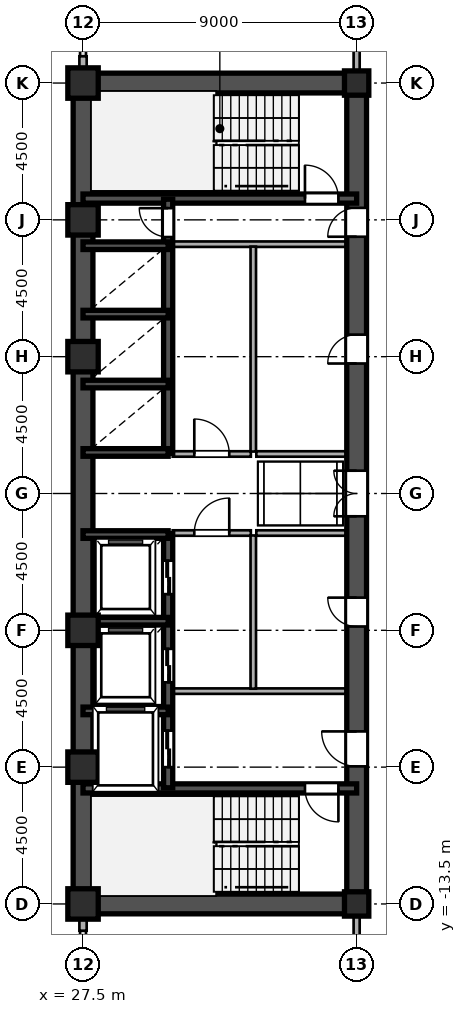
"""IFC4 building model, lengths in metres.
Left out: names, types, materials, properties, quantities, classifications, styles, units other than length and angle.
Written with IfcOpenShell. Run it as: python <this file> out.ifc"""

import sys

from ifc_helpers import new_model, si_unit, direction, frame, frame_2d, origin, origin_2d, place, context, subcontext, project, spatial, rectangle, hollow_rectangle, i_section, extrude, source, transform, mapped, element, fill, save


model = new_model("IFC4")
c1 = context("Model", 3, precision=1e-05, world=origin(), true_north=direction((0.0, 1.0)))
c2 = subcontext(c1, "Body", "Model", "MODEL_VIEW")
j1 = project(units=[si_unit("LENGTHUNIT", "METRE"), si_unit("PLANEANGLEUNIT", "RADIAN")], contexts=[c1])
p1 = place(None, origin())
s1 = spatial("IfcSite", under=j1, at=p1, CompositionType="ELEMENT")
p2 = place(p1, origin())
s2 = spatial("IfcBuilding", under=s1, at=p2, CompositionType="ELEMENT")
p3 = place(p2, frame((0.0, 0.0, 65.7)))
s3 = spatial("IfcBuildingStorey", under=s2, at=p3, CompositionType="ELEMENT", Elevation=65.7)
m1 = source(origin(), c2, "Body", "SweptSolid", [
    extrude(hollow_rectangle(XDim=1.0, YDim=1.0, WallThickness=0.042, at=origin_2d()), origin(), (0.0, 0.0, 1.0), 3.6),
])
for number, where, z_axis, x_axis in (
    (1, (27.5, -13.5, 0.0), (0.0, 0.0, 1.0), (1.0, 0.0, 0.0)),
    (2, (27.5, -9.0, 0.0), (0.0, 0.0, 1.0), (1.0, 0.0, 0.0)),
    (3, (27.5, -4.5, 0.0), (0.0, 0.0, 1.0), (1.0, 0.0, 0.0)),
    (4, (27.5, 4.5, 0.0), (0.0, 0.0, 1.0), (1.0, 0.0, 0.0)),
    (5, (27.5, 9.0, 0.0), (0.0, 0.0, 1.0), (1.0, 0.0, 0.0)),
    (6, (27.5, 13.5, 0.0), (0.0, 0.0, 1.0), (1.0, 0.0, 0.0)),
):
    element("IfcColumn", number, at=place(p3, frame(where, z_axis=z_axis, x_axis=x_axis)), inside=s3, PredefinedType="COLUMN", context=c2, shape_type="MappedRepresentation", body=[
        mapped(m1, transform((0.0, 0.0, 0.0), scale=1.0)),
    ])
m2 = source(origin(), c2, "Body", "SweptSolid", [
    extrude(i_section(OverallWidth=0.8, OverallDepth=0.8, WebThickness=0.032, FlangeThickness=0.05, at=origin_2d()), origin(), (0.0, 0.0, 1.0), 3.6),
])
for number, where, z_axis, x_axis in (
    (7, (36.5, -13.5, 0.0), (0.0, 0.0, 1.0), (1.0, 0.0, 0.0)),
    (8, (36.5, 13.5, 0.0), (0.0, 0.0, 1.0), (1.0, 0.0, 0.0)),
):
    element("IfcColumn", number, at=place(p3, frame(where, z_axis=z_axis, x_axis=x_axis)), inside=s3, PredefinedType="COLUMN", context=c2, shape_type="MappedRepresentation", body=[
        mapped(m2, transform((0.0, 0.0, 0.0), scale=1.0)),
    ])
for number, where, z_axis, x_axis in (
    (9, (27.5, -14.38, 0.0), (0.0, 0.0, 1.0), (0.0, 1.0, 0.0)),
    (10, (27.5, 13.83, 0.0), (0.0, 0.0, 1.0), (0.0, 1.0, 0.0)),
):
    element("IfcWall", number, at=place(p3, frame(where, z_axis=z_axis, x_axis=x_axis)), inside=s3, PredefinedType="SOLIDWALL", context=c2, shape_type="SweptSolid", body=[
        extrude(rectangle(XDim=0.55, YDim=0.24, at=frame_2d((0.275, 0.0))), origin(), (0.0, 0.0, 1.0), 2.88),
    ])
for number, where, z_axis, x_axis in (
    (11, (27.5, -13.5, 0.0), (0.0, 0.0, 1.0), (0.0, 1.0, 0.0)),
    (12, (27.5, 1.3, 0.0), (0.0, 0.0, 1.0), (0.0, 1.0, 0.0)),
):
    element("IfcWall", number, at=place(p3, frame(where, z_axis=z_axis, x_axis=x_axis)), inside=s3, PredefinedType="SHEAR", context=c2, shape_type="SweptSolid", body=[
        extrude(rectangle(XDim=12.2, YDim=0.65, at=frame_2d((6.1, 0.0))), origin(), (0.0, 0.0, 1.0), 3.38),
    ])
p4 = place(p3, frame((27.5, -1.3, 0.0), z_axis=(0.0, 0.0, 1.0), x_axis=(0.0, 1.0, 0.0)))
e13 = element("IfcWall", 13, at=p4, inside=s3, PredefinedType="SHEAR", context=c2, shape_type="SweptSolid", body=[
    extrude(rectangle(XDim=2.6, YDim=0.65, at=frame_2d((1.3, 0.0))), origin(), (0.0, 0.0, 1.0), 3.38),
])
for number, where, z_axis, x_axis in (
    (14, (27.5, -13.5, 0.0), (0.0, 0.0, 1.0), (1.0, 0.0, 0.0)),
    (15, (27.5, 13.5, 0.0), (0.0, 0.0, 1.0), (1.0, 0.0, 0.0)),
):
    element("IfcWall", number, at=place(p3, frame(where, z_axis=z_axis, x_axis=x_axis)), inside=s3, PredefinedType="SHEAR", context=c2, shape_type="SweptSolid", body=[
        extrude(rectangle(XDim=9.0, YDim=0.65, at=frame_2d((4.5, 0.0))), origin(), (0.0, 0.0, 1.0), 3.38),
    ])
p5 = place(p3, frame((36.5, -13.65, 0.0), z_axis=(0.0, 0.0, 1.0), x_axis=(0.0, 1.0, 0.0)))
e16 = element("IfcWall", 16, at=p5, inside=s3, PredefinedType="SHEAR", context=c2, shape_type="SweptSolid", body=[
    extrude(rectangle(XDim=7.15, YDim=0.65, at=frame_2d((3.575, 0.0))), origin(), (0.0, 0.0, 1.0), 3.38),
])
p6 = place(p5, frame((4.675, 0.0, 0.0)))
e17 = element("IfcOpeningElement", 17, at=p6, cuts=e16, PredefinedType="OPENING", context=c2, shape_type="SweptSolid", body=[
    extrude(rectangle(XDim=1.15, YDim=2.2, at=frame_2d((0.575, 1.1))), frame((0.0, 0.335, 0.0), z_axis=(0.0, -1.0, 0.0), x_axis=(1.0, 0.0, 0.0)), (0.0, 0.0, 1.0), 0.67),
])
p7 = place(p3, frame((36.5, -1.3, 0.0), z_axis=(0.0, 0.0, 1.0), x_axis=(0.0, 1.0, 0.0)))
e18 = element("IfcWall", 18, at=p7, inside=s3, PredefinedType="SHEAR", context=c2, shape_type="SweptSolid", body=[
    extrude(rectangle(XDim=2.6, YDim=0.65, at=frame_2d((1.3, 0.0))), origin(), (0.0, 0.0, 1.0), 3.38),
])
p8 = place(p7, frame((0.55, 0.0, 0.0)))
e19 = element("IfcOpeningElement", 19, at=p8, cuts=e18, PredefinedType="OPENING", context=c2, shape_type="SweptSolid", body=[
    extrude(rectangle(XDim=1.5, YDim=2.3, at=frame_2d((0.75, 1.15))), frame((0.0, 0.335, 0.0), z_axis=(0.0, -1.0, 0.0), x_axis=(1.0, 0.0, 0.0)), (0.0, 0.0, 1.0), 0.67),
])
p9 = place(p3, frame((36.5, 8.2, 0.0), z_axis=(0.0, 0.0, 1.0), x_axis=(0.0, 1.0, 0.0)))
e20 = element("IfcWall", 20, at=p9, inside=s3, PredefinedType="SHEAR", context=c2, shape_type="SweptSolid", body=[
    extrude(rectangle(XDim=5.45, YDim=0.65, at=frame_2d((2.725, 0.0))), origin(), (0.0, 0.0, 1.0), 3.38),
])
p10 = place(p9, frame((0.245, 0.0, 0.0)))
e21 = element("IfcOpeningElement", 21, at=p10, cuts=e20, PredefinedType="OPENING", context=c2, shape_type="SweptSolid", body=[
    extrude(rectangle(XDim=0.95, YDim=2.15, at=frame_2d((0.475, 1.075))), frame((0.0, 0.335, 0.0), z_axis=(0.0, -1.0, 0.0), x_axis=(1.0, 0.0, 0.0)), (0.0, 0.0, 1.0), 0.67),
])
p11 = place(p3, frame((36.5, -6.5, 0.0), z_axis=(0.0, 0.0, 1.0), x_axis=(0.0, 1.0, 0.0)))
e22 = element("IfcWall", 22, at=p11, inside=s3, PredefinedType="SHEAR", context=c2, shape_type="SweptSolid", body=[
    extrude(rectangle(XDim=5.2, YDim=0.65, at=frame_2d((2.6, 0.0))), origin(), (0.0, 0.0, 1.0), 3.38),
])
p12 = place(p11, frame((2.125, 0.0, 0.0)))
e23 = element("IfcOpeningElement", 23, at=p12, cuts=e22, PredefinedType="OPENING", context=c2, shape_type="SweptSolid", body=[
    extrude(rectangle(XDim=0.95, YDim=2.15, at=frame_2d((0.475, 1.075))), frame((0.0, 0.335, 0.0), z_axis=(0.0, -1.0, 0.0), x_axis=(1.0, 0.0, 0.0)), (0.0, 0.0, 1.0), 0.67),
])
p13 = place(p3, frame((36.5, 1.3, 0.0), z_axis=(0.0, 0.0, 1.0), x_axis=(0.0, 1.0, 0.0)))
e24 = element("IfcWall", 24, at=p13, inside=s3, PredefinedType="SHEAR", context=c2, shape_type="SweptSolid", body=[
    extrude(rectangle(XDim=6.9, YDim=0.65, at=frame_2d((3.45, 0.0))), origin(), (0.0, 0.0, 1.0), 3.38),
])
p14 = place(p13, frame((2.975, 0.0, 0.0)))
e25 = element("IfcOpeningElement", 25, at=p14, cuts=e24, PredefinedType="OPENING", context=c2, shape_type="SweptSolid", body=[
    extrude(rectangle(XDim=0.95, YDim=2.15, at=frame_2d((0.475, 1.075))), frame((0.0, 0.335, 0.0), z_axis=(0.0, -1.0, 0.0), x_axis=(1.0, 0.0, 0.0)), (0.0, 0.0, 1.0), 0.67),
])
p15 = place(p3, frame((27.5, -9.7, 0.0), z_axis=(0.0, 0.0, 1.0), x_axis=(1.0, 0.0, 0.0)))
e26 = element("IfcWall", 26, at=p15, inside=s3, PredefinedType="SHEAR", context=c2, shape_type="SweptSolid", body=[
    extrude(rectangle(XDim=9.0, YDim=0.3, at=frame_2d((4.5, 0.0))), origin(), (0.0, 0.0, 1.0), 3.38),
])
p16 = place(p15, frame((7.3, 0.0, 0.0)))
e27 = element("IfcOpeningElement", 27, at=p16, cuts=e26, PredefinedType="OPENING", context=c2, shape_type="SweptSolid", body=[
    extrude(rectangle(XDim=1.1, YDim=2.2, at=frame_2d((0.55, 1.1))), frame((0.0, 0.16, 0.0), z_axis=(0.0, -1.0, 0.0), x_axis=(1.0, 0.0, 0.0)), (0.0, 0.0, 1.0), 0.32),
])
p17 = place(p3, frame((27.5, 9.7, 0.0), z_axis=(0.0, 0.0, 1.0), x_axis=(1.0, 0.0, 0.0)))
e28 = element("IfcWall", 28, at=p17, inside=s3, PredefinedType="SHEAR", context=c2, shape_type="SweptSolid", body=[
    extrude(rectangle(XDim=9.0, YDim=0.3, at=frame_2d((4.5, 0.0))), origin(), (0.0, 0.0, 1.0), 3.38),
])
p18 = place(p17, frame((7.3, 0.0, 0.0)))
e29 = element("IfcOpeningElement", 29, at=p18, cuts=e28, PredefinedType="OPENING", context=c2, shape_type="SweptSolid", body=[
    extrude(rectangle(XDim=1.1, YDim=2.2, at=frame_2d((0.55, 1.1))), frame((0.0, 0.16, 0.0), z_axis=(0.0, -1.0, 0.0), x_axis=(1.0, 0.0, 0.0)), (0.0, 0.0, 1.0), 0.32),
])
for number, where, z_axis, x_axis in (
    (30, (27.5, -7.15, 0.0), (0.0, 0.0, 1.0), (1.0, 0.0, 0.0)),
    (31, (27.5, -4.2, 0.0), (0.0, 0.0, 1.0), (1.0, 0.0, 0.0)),
    (32, (27.5, -1.35, 0.0), (0.0, 0.0, 1.0), (1.0, 0.0, 0.0)),
    (33, (27.5, 1.35, 0.0), (0.0, 0.0, 1.0), (1.0, 0.0, 0.0)),
    (34, (27.5, 3.6, 0.0), (0.0, 0.0, 1.0), (1.0, 0.0, 0.0)),
    (35, (27.5, 5.9, 0.0), (0.0, 0.0, 1.0), (1.0, 0.0, 0.0)),
    (36, (27.5, 8.15, 0.0), (0.0, 0.0, 1.0), (1.0, 0.0, 0.0)),
):
    element("IfcWall", number, at=place(p3, frame(where, z_axis=z_axis, x_axis=x_axis)), inside=s3, PredefinedType="SHEAR", context=c2, shape_type="SweptSolid", body=[
        extrude(rectangle(XDim=2.8, YDim=0.25, at=frame_2d((1.4, 0.0))), origin(), (0.0, 0.0, 1.0), 3.38),
    ])
p19 = place(p3, frame((30.3, -9.68, 0.0), z_axis=(0.0, 0.0, 1.0), x_axis=(0.0, 1.0, 0.0)))
e37 = element("IfcWall", 37, at=p19, inside=s3, PredefinedType="SHEAR", context=c2, shape_type="SweptSolid", body=[
    extrude(rectangle(XDim=2.56, YDim=0.3, at=frame_2d((1.28, 0.0))), origin(), (0.0, 0.0, 1.0), 3.38),
])
p20 = place(p19, frame((0.68, 0.0, 0.0)))
e38 = element("IfcOpeningElement", 38, at=p20, cuts=e37, PredefinedType="OPENING", context=c2, shape_type="SweptSolid", body=[
    extrude(rectangle(XDim=1.2, YDim=2.25, at=frame_2d((0.6, 1.125))), frame((0.0, 0.16, 0.0), z_axis=(0.0, -1.0, 0.0), x_axis=(1.0, 0.0, 0.0)), (0.0, 0.0, 1.0), 0.32),
])
p21 = place(p3, frame((30.3, -7.12, 0.0), z_axis=(0.0, 0.0, 1.0), x_axis=(0.0, 1.0, 0.0)))
e39 = element("IfcWall", 39, at=p21, inside=s3, PredefinedType="SHEAR", context=c2, shape_type="SweptSolid", body=[
    extrude(rectangle(XDim=2.92, YDim=0.3, at=frame_2d((1.46, 0.0))), origin(), (0.0, 0.0, 1.0), 3.38),
])
p22 = place(p21, frame((0.91, 0.0, 0.0)))
e40 = element("IfcOpeningElement", 40, at=p22, cuts=e39, PredefinedType="OPENING", context=c2, shape_type="SweptSolid", body=[
    extrude(rectangle(XDim=1.1, YDim=2.2, at=frame_2d((0.55, 1.1))), frame((0.0, 0.16, 0.0), z_axis=(0.0, -1.0, 0.0), x_axis=(1.0, 0.0, 0.0)), (0.0, 0.0, 1.0), 0.32),
])
p23 = place(p3, frame((30.3, -4.2, 0.0), z_axis=(0.0, 0.0, 1.0), x_axis=(0.0, 1.0, 0.0)))
e41 = element("IfcWall", 41, at=p23, inside=s3, PredefinedType="SHEAR", context=c2, shape_type="SweptSolid", body=[
    extrude(rectangle(XDim=2.88, YDim=0.3, at=frame_2d((1.44, 0.0))), origin(), (0.0, 0.0, 1.0), 3.38),
])
p24 = place(p23, frame((0.89, 0.0, 0.0)))
e42 = element("IfcOpeningElement", 42, at=p24, cuts=e41, PredefinedType="OPENING", context=c2, shape_type="SweptSolid", body=[
    extrude(rectangle(XDim=1.1, YDim=2.2, at=frame_2d((0.55, 1.1))), frame((0.0, 0.16, 0.0), z_axis=(0.0, -1.0, 0.0), x_axis=(1.0, 0.0, 0.0)), (0.0, 0.0, 1.0), 0.32),
])
p25 = place(p3, frame((30.3, 1.32, 0.0), z_axis=(0.0, 0.0, 1.0), x_axis=(0.0, 1.0, 0.0)))
e43 = element("IfcWall", 43, at=p25, inside=s3, PredefinedType="SHEAR", context=c2, shape_type="SweptSolid", body=[
    extrude(rectangle(XDim=2.28, YDim=0.3, at=frame_2d((1.14, 0.0))), origin(), (0.0, 0.0, 1.0), 3.38),
])
p26 = place(p3, frame((30.3, 3.6, 0.0), z_axis=(0.0, 0.0, 1.0), x_axis=(0.0, 1.0, 0.0)))
e44 = element("IfcWall", 44, at=p26, inside=s3, PredefinedType="SHEAR", context=c2, shape_type="SweptSolid", body=[
    extrude(rectangle(XDim=2.3, YDim=0.3, at=frame_2d((1.15, 0.0))), origin(), (0.0, 0.0, 1.0), 3.38),
])
p27 = place(p3, frame((30.3, 5.9, 0.0), z_axis=(0.0, 0.0, 1.0), x_axis=(0.0, 1.0, 0.0)))
e45 = element("IfcWall", 45, at=p27, inside=s3, PredefinedType="SHEAR", context=c2, shape_type="SweptSolid", body=[
    extrude(rectangle(XDim=2.25, YDim=0.3, at=frame_2d((1.125, 0.0))), origin(), (0.0, 0.0, 1.0), 3.38),
])
p28 = place(p3, frame((30.3, 8.15, 0.0), z_axis=(0.0, 0.0, 1.0), x_axis=(0.0, 1.0, 0.0)))
e46 = element("IfcWall", 46, at=p28, inside=s3, PredefinedType="SHEAR", context=c2, shape_type="SweptSolid", body=[
    extrude(rectangle(XDim=1.53, YDim=0.3, at=frame_2d((0.765, 0.0))), origin(), (0.0, 0.0, 1.0), 3.38),
])
p29 = place(p28, frame((0.285, 0.0, 0.0)))
e47 = element("IfcOpeningElement", 47, at=p29, cuts=e46, PredefinedType="OPENING", context=c2, shape_type="SweptSolid", body=[
    extrude(rectangle(XDim=0.95, YDim=2.15, at=frame_2d((0.475, 1.075))), frame((0.0, 0.16, 0.0), z_axis=(0.0, -1.0, 0.0), x_axis=(1.0, 0.0, 0.0)), (0.0, 0.0, 1.0), 0.32),
])
for number, where, z_axis, x_axis in (
    (48, (30.45, -6.5, 0.0), (0.0, 0.0, 1.0), (1.0, 0.0, 0.0)),
    (49, (30.45, 8.2, 0.0), (0.0, 0.0, 1.0), (1.0, 0.0, 0.0)),
):
    element("IfcWall", number, at=place(p3, frame(where, z_axis=z_axis, x_axis=x_axis)), inside=s3, PredefinedType="PARTITIONING", context=c2, shape_type="SweptSolid", body=[
        extrude(rectangle(XDim=5.7, YDim=0.18, at=frame_2d((2.85, 0.0))), origin(), (0.0, 0.0, 1.0), 3.38),
    ])
p30 = place(p3, frame((33.1, -6.42, 0.0), z_axis=(0.0, 0.0, 1.0), x_axis=(0.0, 1.0, 0.0)))
e50 = element("IfcWall", 50, at=p30, inside=s3, PredefinedType="PARTITIONING", context=c2, shape_type="SweptSolid", body=[
    extrude(rectangle(XDim=5.04, YDim=0.18, at=frame_2d((2.52, 0.0))), origin(), (0.0, 0.0, 1.0), 3.38),
])
p31 = place(p3, frame((33.1, 1.38, 0.0), z_axis=(0.0, 0.0, 1.0), x_axis=(0.0, 1.0, 0.0)))
e51 = element("IfcWall", 51, at=p31, inside=s3, PredefinedType="PARTITIONING", context=c2, shape_type="SweptSolid", body=[
    extrude(rectangle(XDim=6.74, YDim=0.18, at=frame_2d((3.37, 0.0))), origin(), (0.0, 0.0, 1.0), 3.38),
])
p32 = place(p3, frame((30.45, -1.3, 0.0), z_axis=(0.0, 0.0, 1.0), x_axis=(1.0, 0.0, 0.0)))
e52 = element("IfcWall", 52, at=p32, inside=s3, PredefinedType="PARTITIONING", context=c2, shape_type="SweptSolid", body=[
    extrude(rectangle(XDim=2.57, YDim=0.18, at=frame_2d((1.285, 0.0))), origin(), (0.0, 0.0, 1.0), 3.38),
])
p33 = place(p32, frame((0.71, 0.0, 0.0)))
e53 = element("IfcOpeningElement", 53, at=p33, cuts=e52, PredefinedType="OPENING", context=c2, shape_type="SweptSolid", body=[
    extrude(rectangle(XDim=1.15, YDim=2.2, at=frame_2d((0.575, 1.1))), frame((0.0, 0.1, 0.0), z_axis=(0.0, -1.0, 0.0), x_axis=(1.0, 0.0, 0.0)), (0.0, 0.0, 1.0), 0.2),
])
p34 = place(p3, frame((30.45, 1.3, 0.0), z_axis=(0.0, 0.0, 1.0), x_axis=(1.0, 0.0, 0.0)))
e54 = element("IfcWall", 54, at=p34, inside=s3, PredefinedType="PARTITIONING", context=c2, shape_type="SweptSolid", body=[
    extrude(rectangle(XDim=2.57, YDim=0.18, at=frame_2d((1.285, 0.0))), origin(), (0.0, 0.0, 1.0), 3.38),
])
p35 = place(p34, frame((0.71, 0.0, 0.0)))
e55 = element("IfcOpeningElement", 55, at=p35, cuts=e54, PredefinedType="OPENING", context=c2, shape_type="SweptSolid", body=[
    extrude(rectangle(XDim=1.15, YDim=2.2, at=frame_2d((0.575, 1.1))), frame((0.0, 0.1, 0.0), z_axis=(0.0, -1.0, 0.0), x_axis=(1.0, 0.0, 0.0)), (0.0, 0.0, 1.0), 0.2),
])
for number, where, z_axis, x_axis in (
    (56, (33.2, -1.3, 0.0), (0.0, 0.0, 1.0), (1.0, 0.0, 0.0)),
    (57, (33.2, 1.3, 0.0), (0.0, 0.0, 1.0), (1.0, 0.0, 0.0)),
):
    element("IfcWall", number, at=place(p3, frame(where, z_axis=z_axis, x_axis=x_axis)), inside=s3, PredefinedType="PARTITIONING", context=c2, shape_type="SweptSolid", body=[
        extrude(rectangle(XDim=2.95, YDim=0.18, at=frame_2d((1.475, 0.0))), origin(), (0.0, 0.0, 1.0), 3.38),
    ])
for number, where, z_axis, x_axis in (
    (58, (36.5, -15.515, 0.0), (0.0, 0.0, 1.0), (0.0, 1.0, 0.0)),
    (59, (36.5, 13.83, 0.0), (0.0, 0.0, 1.0), (0.0, 1.0, 0.0)),
):
    element("IfcWall", number, at=place(p3, frame(where, z_axis=z_axis, x_axis=x_axis)), inside=s3, PredefinedType="PARTITIONING", context=c2, shape_type="SweptSolid", body=[
        extrude(rectangle(XDim=1.685, YDim=0.2, at=frame_2d((0.842, 0.0))), origin(), (0.0, 0.0, 1.0), 2.68),
    ])
m3 = source(origin(), c2, "Body", "SweptSolid", [
    extrude(rectangle(XDim=1.15, YDim=2.2, at=frame_2d((0.575, 1.1))), frame((0.0, 0.025, 0.0), z_axis=(0.0, -1.0, 0.0), x_axis=(1.0, 0.0, 0.0)), (0.0, 0.0, 1.0), 0.05),
])
p36 = place(p6, origin())
e60 = element("IfcDoor", 60, at=p36, inside=s3, OperationType="SINGLE_SWING_RIGHT", PredefinedType="DOOR", context=c2, shape_type="MappedRepresentation", body=[
    mapped(m3, transform((0.0, 0.0, 0.0), scale=1.0)),
])
fill(e17, e60)
m4 = source(origin(), c2, "Body", "SweptSolid", [
    extrude(rectangle(XDim=1.5, YDim=2.3, at=frame_2d((0.75, 1.15))), frame((0.0, 0.025, 0.0), z_axis=(0.0, -1.0, 0.0), x_axis=(1.0, 0.0, 0.0)), (0.0, 0.0, 1.0), 0.05),
])
p37 = place(p8, origin())
e61 = element("IfcDoor", 61, at=p37, inside=s3, OperationType="DOUBLE_SWING_LEFT", PredefinedType="DOOR", context=c2, shape_type="MappedRepresentation", body=[
    mapped(m4, transform((0.0, 0.0, 0.0), scale=1.0)),
])
fill(e19, e61)
m5 = source(origin(), c2, "Body", "SweptSolid", [
    extrude(rectangle(XDim=0.95, YDim=2.15, at=frame_2d((0.475, 1.075))), frame((0.0, 0.025, 0.0), z_axis=(0.0, -1.0, 0.0), x_axis=(1.0, 0.0, 0.0)), (0.0, 0.0, 1.0), 0.05),
])
p38 = place(p10, origin())
e62 = element("IfcDoor", 62, at=p38, inside=s3, OperationType="SINGLE_SWING_LEFT", PredefinedType="DOOR", context=c2, shape_type="MappedRepresentation", body=[
    mapped(m5, transform((0.0, 0.0, 0.0), scale=1.0)),
])
fill(e21, e62)
p39 = place(p12, origin())
e63 = element("IfcDoor", 63, at=p39, inside=s3, OperationType="SINGLE_SWING_RIGHT", PredefinedType="DOOR", context=c2, shape_type="MappedRepresentation", body=[
    mapped(m5, transform((0.0, 0.0, 0.0), scale=1.0)),
])
fill(e23, e63)
p40 = place(p14, origin())
e64 = element("IfcDoor", 64, at=p40, inside=s3, OperationType="SINGLE_SWING_LEFT", PredefinedType="DOOR", context=c2, shape_type="MappedRepresentation", body=[
    mapped(m5, transform((0.0, 0.0, 0.0), scale=1.0)),
])
fill(e25, e64)
m6 = source(origin(), c2, "Body", "SweptSolid", [
    extrude(rectangle(XDim=1.1, YDim=2.2, at=frame_2d((0.55, 1.1))), frame((0.0, 0.025, 0.0), z_axis=(0.0, -1.0, 0.0), x_axis=(1.0, 0.0, 0.0)), (0.0, 0.0, 1.0), 0.05),
])
p41 = place(p16, frame((1.1, 0.0, 0.0), z_axis=(0.0, 0.0, 1.0), x_axis=(-1.0, 0.0, 0.0)))
e65 = element("IfcDoor", 65, at=p41, inside=s3, OperationType="SINGLE_SWING_RIGHT", PredefinedType="DOOR", context=c2, shape_type="MappedRepresentation", body=[
    mapped(m6, transform((0.0, 0.0, 0.0), scale=1.0)),
])
fill(e27, e65)
p42 = place(p18, origin())
e66 = element("IfcDoor", 66, at=p42, inside=s3, OperationType="SINGLE_SWING_LEFT", PredefinedType="DOOR", context=c2, shape_type="MappedRepresentation", body=[
    mapped(m6, transform((0.0, 0.0, 0.0), scale=1.0)),
])
fill(e29, e66)
m7 = source(origin(), c2, "Body", "SweptSolid", [
    extrude(rectangle(XDim=1.2, YDim=2.25, at=frame_2d((0.6, 1.125))), frame((0.0, 0.025, 0.0), z_axis=(0.0, -1.0, 0.0), x_axis=(1.0, 0.0, 0.0)), (0.0, 0.0, 1.0), 0.05),
])
p43 = place(p20, origin())
e67 = element("IfcDoor", 67, at=p43, inside=s3, OperationType="DOUBLE_DOOR_SLIDING", PredefinedType="DOOR", context=c2, shape_type="MappedRepresentation", body=[
    mapped(m7, transform((0.0, 0.0, 0.0), scale=1.0)),
])
fill(e38, e67)
m8 = source(origin(), c2, "Body", "SweptSolid", [
    extrude(rectangle(XDim=1.1, YDim=2.2, at=frame_2d((0.55, 1.1))), frame((0.0, 0.025, 0.0), z_axis=(0.0, -1.0, 0.0), x_axis=(1.0, 0.0, 0.0)), (0.0, 0.0, 1.0), 0.05),
])
p44 = place(p22, origin())
e68 = element("IfcDoor", 68, at=p44, inside=s3, OperationType="DOUBLE_DOOR_SLIDING", PredefinedType="DOOR", context=c2, shape_type="MappedRepresentation", body=[
    mapped(m8, transform((0.0, 0.0, 0.0), scale=1.0)),
])
fill(e40, e68)
p45 = place(p24, origin())
e69 = element("IfcDoor", 69, at=p45, inside=s3, OperationType="DOUBLE_DOOR_SLIDING", PredefinedType="DOOR", context=c2, shape_type="MappedRepresentation", body=[
    mapped(m8, transform((0.0, 0.0, 0.0), scale=1.0)),
])
fill(e42, e69)
p46 = place(p29, origin())
e70 = element("IfcDoor", 70, at=p46, inside=s3, OperationType="SINGLE_SWING_RIGHT", PredefinedType="DOOR", context=c2, shape_type="MappedRepresentation", body=[
    mapped(m5, transform((0.0, 0.0, 0.0), scale=1.0)),
])
fill(e47, e70)
p47 = place(p33, origin())
e71 = element("IfcDoor", 71, at=p47, inside=s3, OperationType="SINGLE_SWING_RIGHT", PredefinedType="DOOR", context=c2, shape_type="MappedRepresentation", body=[
    mapped(m3, transform((0.0, 0.0, 0.0), scale=1.0)),
])
fill(e53, e71)
p48 = place(p35, origin())
e72 = element("IfcDoor", 72, at=p48, inside=s3, OperationType="SINGLE_SWING_LEFT", PredefinedType="DOOR", context=c2, shape_type="MappedRepresentation", body=[
    mapped(m3, transform((0.0, 0.0, 0.0), scale=1.0)),
])
fill(e55, e72)
save(model, sys.argv[1])
